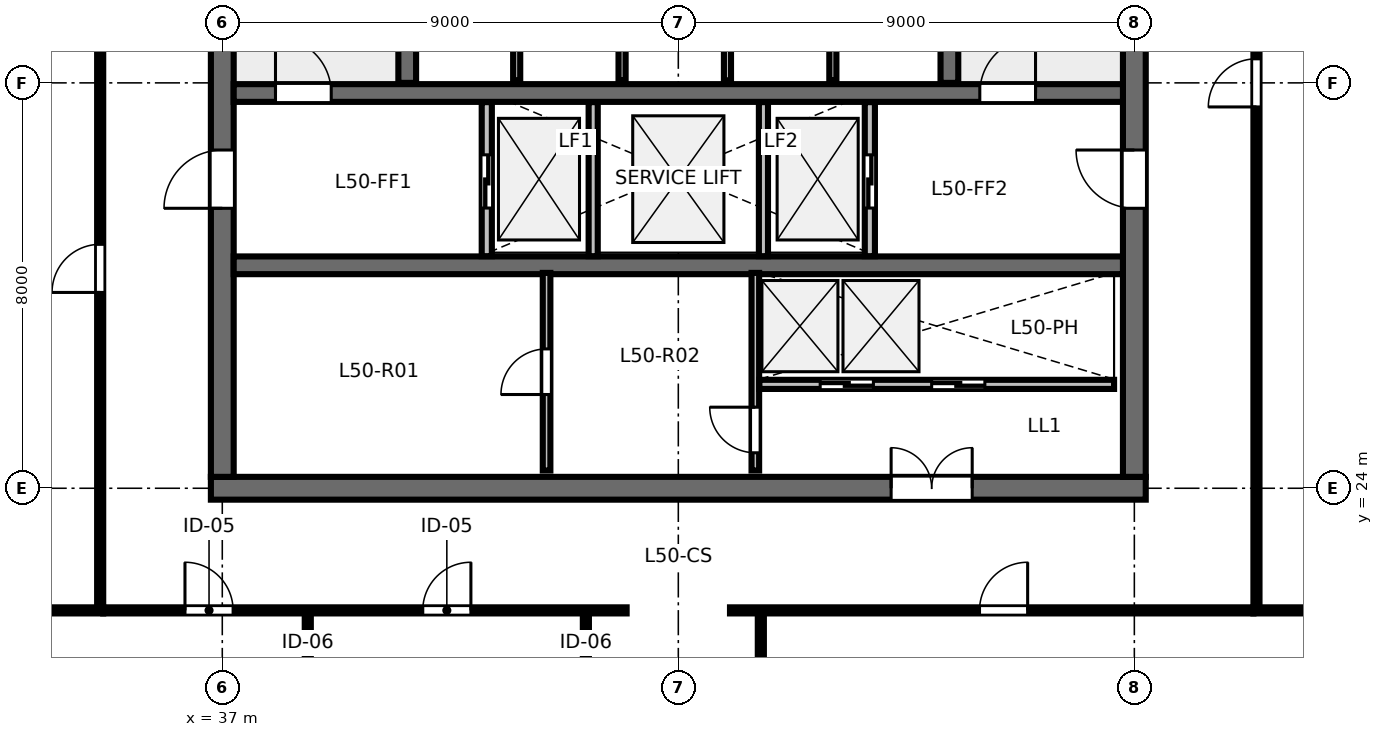
"""IFC4 building model, lengths in metres.
Left out: names, types, materials, properties, quantities, classifications, styles, units other than length and angle.
Written with IfcOpenShell. Run it as: python <this file> out.ifc"""

import sys

from ifc_helpers import new_model, si_unit, direction, frame, frame_2d, origin, place, context, subcontext, project, spatial, rectangle, extrude, element, fill, save


model = new_model("IFC4")
c1 = context("Model", 3, precision=1e-05, world=origin(), true_north=direction((0.0, 1.0)))
c2 = subcontext(c1, "Body", "Model", "MODEL_VIEW")
j1 = project(units=[si_unit("LENGTHUNIT", "METRE"), si_unit("PLANEANGLEUNIT", "RADIAN")], contexts=[c1])
p1 = place(None, origin())
s1 = spatial("IfcSite", under=j1, at=p1, CompositionType="ELEMENT")
p2 = place(p1, origin())
s2 = spatial("IfcBuilding", under=s1, at=p2, CompositionType="ELEMENT")
p3 = place(p2, frame((0.0, 0.0, 191.4)))
s3 = spatial("IfcBuildingStorey", under=s2, at=p3, CompositionType="ELEMENT", Elevation=191.4)
p4 = place(p3, frame((36.775, 24.0, 0.0), z_axis=(0.0, 0.0, 1.0), x_axis=(1.0, 0.0, 0.0)))
e1 = element("IfcWall", 1, at=p4, inside=s3, PredefinedType="SHEAR", context=c2, shape_type="SweptSolid", body=[
    extrude(rectangle(XDim=18.45, YDim=0.45, at=frame_2d((9.225, 0.0))), origin(), (0.0, 0.0, 1.0), 3.36),
])
p5 = place(p4, frame((13.425, 0.0, 0.0)))
e2 = element("IfcOpeningElement", 2, at=p5, cuts=e1, PredefinedType="OPENING", context=c2, shape_type="SweptSolid", body=[
    extrude(rectangle(XDim=1.6, YDim=2.15, at=frame_2d((0.8, 1.075))), frame((0.0, 0.235, 0.0), z_axis=(0.0, -1.0, 0.0), x_axis=(1.0, 0.0, 0.0)), (0.0, 0.0, 1.0), 0.47),
])
p6 = place(p3, frame((37.0, 24.225, 0.0), z_axis=(0.0, 0.0, 1.0), x_axis=(0.0, 1.0, 0.0)))
e3 = element("IfcWall", 3, at=p6, inside=s3, PredefinedType="SHEAR", context=c2, shape_type="SweptSolid", body=[
    extrude(rectangle(XDim=15.55, YDim=0.45, at=frame_2d((7.775, 0.0))), origin(), (0.0, 0.0, 1.0), 3.36),
])
p7 = place(p6, frame((5.3, 0.0, 0.0)))
e4 = element("IfcOpeningElement", 4, at=p7, cuts=e3, PredefinedType="OPENING", context=c2, shape_type="SweptSolid", body=[
    extrude(rectangle(XDim=1.15, YDim=2.15, at=frame_2d((0.575, 1.075))), frame((0.0, 0.235, 0.0), z_axis=(0.0, -1.0, 0.0), x_axis=(1.0, 0.0, 0.0)), (0.0, 0.0, 1.0), 0.47),
])
p8 = place(p3, frame((55.0, 24.225, 0.0), z_axis=(0.0, 0.0, 1.0), x_axis=(0.0, 1.0, 0.0)))
e5 = element("IfcWall", 5, at=p8, inside=s3, PredefinedType="SHEAR", context=c2, shape_type="SweptSolid", body=[
    extrude(rectangle(XDim=15.55, YDim=0.45, at=frame_2d((7.775, 0.0))), origin(), (0.0, 0.0, 1.0), 3.36),
])
p9 = place(p8, frame((5.3, 0.0, 0.0)))
e6 = element("IfcOpeningElement", 6, at=p9, cuts=e5, PredefinedType="OPENING", context=c2, shape_type="SweptSolid", body=[
    extrude(rectangle(XDim=1.15, YDim=2.15, at=frame_2d((0.575, 1.075))), frame((0.0, 0.235, 0.0), z_axis=(0.0, -1.0, 0.0), x_axis=(1.0, 0.0, 0.0)), (0.0, 0.0, 1.0), 0.47),
])
p10 = place(p3, frame((37.225, 31.8, 0.0), z_axis=(0.0, 0.0, 1.0), x_axis=(1.0, 0.0, 0.0)))
e7 = element("IfcWall", 7, at=p10, inside=s3, PredefinedType="SHEAR", context=c2, shape_type="SweptSolid", body=[
    extrude(rectangle(XDim=17.55, YDim=0.35, at=frame_2d((8.775, 0.0))), origin(), (0.0, 0.0, 1.0), 3.36),
])
p11 = place(p10, frame((0.825, 0.0, 0.0)))
e8 = element("IfcOpeningElement", 8, at=p11, cuts=e7, PredefinedType="OPENING", context=c2, shape_type="SweptSolid", body=[
    extrude(rectangle(XDim=1.1, YDim=2.15, at=frame_2d((0.55, 1.075))), frame((0.0, 0.185, 0.0), z_axis=(0.0, -1.0, 0.0), x_axis=(1.0, 0.0, 0.0)), (0.0, 0.0, 1.0), 0.37),
])
p12 = place(p10, frame((14.725, 0.0, 0.0)))
e9 = element("IfcOpeningElement", 9, at=p12, cuts=e7, PredefinedType="OPENING", context=c2, shape_type="SweptSolid", body=[
    extrude(rectangle(XDim=1.1, YDim=2.15, at=frame_2d((0.55, 1.075))), frame((0.0, 0.185, 0.0), z_axis=(0.0, -1.0, 0.0), x_axis=(1.0, 0.0, 0.0)), (0.0, 0.0, 1.0), 0.37),
])
p13 = place(p3, frame((37.225, 28.4, 0.0), z_axis=(0.0, 0.0, 1.0), x_axis=(1.0, 0.0, 0.0)))
e10 = element("IfcWall", 10, at=p13, inside=s3, PredefinedType="SHEAR", context=c2, shape_type="SweptSolid", body=[
    extrude(rectangle(XDim=17.55, YDim=0.35, at=frame_2d((8.775, 0.0))), origin(), (0.0, 0.0, 1.0), 3.36),
])
for number, where, z_axis, x_axis in (
    (11, (40.65, 32.0, 0.0), (0.0, 0.0, 1.0), (0.0, 1.0, 0.0)),
    (12, (51.35, 32.0, 0.0), (0.0, 0.0, 1.0), (0.0, 1.0, 0.0)),
):
    element("IfcWall", number, at=place(p3, frame(where, z_axis=z_axis, x_axis=x_axis)), inside=s3, PredefinedType="SHEAR", context=c2, shape_type="SweptSolid", body=[
        extrude(rectangle(XDim=7.7, YDim=0.35, at=frame_2d((3.85, 0.0))), origin(), (0.0, 0.0, 1.0), 3.6),
    ])
for number, where, z_axis, x_axis in (
    (13, (42.81, 32.05, 0.0), (0.0, 0.0, 1.0), (0.0, 1.0, 0.0)),
    (14, (44.89, 32.05, 0.0), (0.0, 0.0, 1.0), (0.0, 1.0, 0.0)),
    (15, (46.97, 32.05, 0.0), (0.0, 0.0, 1.0), (0.0, 1.0, 0.0)),
    (16, (49.05, 32.05, 0.0), (0.0, 0.0, 1.0), (0.0, 1.0, 0.0)),
):
    element("IfcWall", number, at=place(p3, frame(where, z_axis=z_axis, x_axis=x_axis)), inside=s3, PredefinedType="PARTITIONING", context=c2, shape_type="SweptSolid", body=[
        extrude(rectangle(XDim=5.5, YDim=0.14, at=frame_2d((2.75, 0.0))), origin(), (0.0, 0.0, 1.0), 3.375),
    ])
p14 = place(p3, frame((42.22, 28.58, 0.0), z_axis=(0.0, 0.0, 1.0), x_axis=(0.0, 1.0, 0.0)))
e17 = element("IfcWall", 17, at=p14, inside=s3, PredefinedType="PARTITIONING", context=c2, shape_type="SweptSolid", body=[
    extrude(rectangle(XDim=3.04, YDim=0.2, at=frame_2d((1.52, 0.0))), origin(), (0.0, 0.0, 1.0), 3.375),
])
p15 = place(p14, frame((0.95, 0.0, 0.0)))
e18 = element("IfcOpeningElement", 18, at=p15, cuts=e17, PredefinedType="OPENING", context=c2, shape_type="SweptSolid", body=[
    extrude(rectangle(XDim=1.05, YDim=2.15, at=frame_2d((0.525, 1.075))), frame((0.0, 0.11, 0.0), z_axis=(0.0, -1.0, 0.0), x_axis=(1.0, 0.0, 0.0)), (0.0, 0.0, 1.0), 0.22),
])
p16 = place(p3, frame((49.78, 28.58, 0.0), z_axis=(0.0, 0.0, 1.0), x_axis=(0.0, 1.0, 0.0)))
e19 = element("IfcWall", 19, at=p16, inside=s3, PredefinedType="PARTITIONING", context=c2, shape_type="SweptSolid", body=[
    extrude(rectangle(XDim=3.04, YDim=0.2, at=frame_2d((1.52, 0.0))), origin(), (0.0, 0.0, 1.0), 3.375),
])
p17 = place(p16, frame((0.95, 0.0, 0.0)))
e20 = element("IfcOpeningElement", 20, at=p17, cuts=e19, PredefinedType="OPENING", context=c2, shape_type="SweptSolid", body=[
    extrude(rectangle(XDim=1.05, YDim=2.15, at=frame_2d((0.525, 1.075))), frame((0.0, 0.11, 0.0), z_axis=(0.0, -1.0, 0.0), x_axis=(1.0, 0.0, 0.0)), (0.0, 0.0, 1.0), 0.22),
])
for number, where, z_axis, x_axis in (
    (21, (44.32, 28.58, 0.0), (0.0, 0.0, 1.0), (0.0, 1.0, 0.0)),
    (22, (47.68, 28.58, 0.0), (0.0, 0.0, 1.0), (0.0, 1.0, 0.0)),
):
    element("IfcWall", number, at=place(p3, frame(where, z_axis=z_axis, x_axis=x_axis)), inside=s3, PredefinedType="PARTITIONING", context=c2, shape_type="SweptSolid", body=[
        extrude(rectangle(XDim=3.04, YDim=0.18, at=frame_2d((1.52, 0.0))), origin(), (0.0, 0.0, 1.0), 3.375),
    ])
p18 = place(p3, frame((43.4, 24.35, 0.0), z_axis=(0.0, 0.0, 1.0), x_axis=(0.0, 1.0, 0.0)))
e23 = element("IfcWall", 23, at=p18, inside=s3, PredefinedType="PARTITIONING", context=c2, shape_type="SweptSolid", body=[
    extrude(rectangle(XDim=3.9, YDim=0.15, at=frame_2d((1.95, 0.0))), origin(), (0.0, 0.0, 1.0), 3.375),
])
p19 = place(p18, frame((1.5, 0.0, 0.0)))
e24 = element("IfcOpeningElement", 24, at=p19, cuts=e23, PredefinedType="OPENING", context=c2, shape_type="SweptSolid", body=[
    extrude(rectangle(XDim=0.9, YDim=2.15, at=frame_2d((0.45, 1.075))), frame((0.0, 0.085, 0.0), z_axis=(0.0, -1.0, 0.0), x_axis=(1.0, 0.0, 0.0)), (0.0, 0.0, 1.0), 0.17),
])
p20 = place(p3, frame((47.52, 24.35, 0.0), z_axis=(0.0, 0.0, 1.0), x_axis=(0.0, 1.0, 0.0)))
e25 = element("IfcWall", 25, at=p20, inside=s3, PredefinedType="PARTITIONING", context=c2, shape_type="SweptSolid", body=[
    extrude(rectangle(XDim=3.9, YDim=0.15, at=frame_2d((1.95, 0.0))), origin(), (0.0, 0.0, 1.0), 3.375),
])
p21 = place(p20, frame((0.35, 0.0, 0.0)))
e26 = element("IfcOpeningElement", 26, at=p21, cuts=e25, PredefinedType="OPENING", context=c2, shape_type="SweptSolid", body=[
    extrude(rectangle(XDim=0.9, YDim=2.15, at=frame_2d((0.45, 1.075))), frame((0.0, 0.085, 0.0), z_axis=(0.0, -1.0, 0.0), x_axis=(1.0, 0.0, 0.0)), (0.0, 0.0, 1.0), 0.17),
])
p22 = place(p3, frame((47.6, 26.05, 0.0), z_axis=(0.0, 0.0, 1.0), x_axis=(1.0, 0.0, 0.0)))
e27 = element("IfcWall", 27, at=p22, inside=s3, PredefinedType="PARTITIONING", context=c2, shape_type="SweptSolid", body=[
    extrude(rectangle(XDim=7.0, YDim=0.18, at=frame_2d((3.5, 0.0))), origin(), (0.0, 0.0, 1.0), 3.375),
])
p23 = place(p22, frame((1.2, 0.0, 0.0)))
e28 = element("IfcOpeningElement", 28, at=p23, cuts=e27, PredefinedType="OPENING", context=c2, shape_type="SweptSolid", body=[
    extrude(rectangle(XDim=1.05, YDim=2.15, at=frame_2d((0.525, 1.075))), frame((0.0, 0.1, 0.0), z_axis=(0.0, -1.0, 0.0), x_axis=(1.0, 0.0, 0.0)), (0.0, 0.0, 1.0), 0.2),
])
p24 = place(p22, frame((3.4, 0.0, 0.0)))
e29 = element("IfcOpeningElement", 29, at=p24, cuts=e27, PredefinedType="OPENING", context=c2, shape_type="SweptSolid", body=[
    extrude(rectangle(XDim=1.05, YDim=2.15, at=frame_2d((0.525, 1.075))), frame((0.0, 0.1, 0.0), z_axis=(0.0, -1.0, 0.0), x_axis=(1.0, 0.0, 0.0)), (0.0, 0.0, 1.0), 0.2),
])
p25 = place(p3, frame((38.687, 21.59, 0.0), z_axis=(0.0, 0.0, 1.0), x_axis=(0.0, -1.0, 0.0)))
e30 = element("IfcWall", 30, at=p25, inside=s3, PredefinedType="PARTITIONING", context=c2, shape_type="SweptSolid", body=[
    extrude(rectangle(XDim=8.67, YDim=0.12, at=frame_2d((4.335, 0.0))), origin(), (0.0, 0.0, 1.0), 2.655),
])
p26 = place(p25, frame((1.4, 0.0, 0.0)))
e31 = element("IfcOpeningElement", 31, at=p26, cuts=e30, PredefinedType="OPENING", context=c2, shape_type="SweptSolid", body=[
    extrude(rectangle(XDim=0.9, YDim=2.15, at=frame_2d((0.45, 1.075))), frame((0.0, 0.07, 0.0), z_axis=(0.0, -1.0, 0.0), x_axis=(1.0, 0.0, 0.0)), (0.0, 0.0, 1.0), 0.14),
])
p27 = place(p3, frame((44.176, 21.59, 0.0), z_axis=(0.0, 0.0, 1.0), x_axis=(0.0, -1.0, 0.0)))
e32 = element("IfcWall", 32, at=p27, inside=s3, PredefinedType="PARTITIONING", context=c2, shape_type="SweptSolid", body=[
    extrude(rectangle(XDim=8.67, YDim=0.12, at=frame_2d((4.335, 0.0))), origin(), (0.0, 0.0, 1.0), 2.655),
])
p28 = place(p27, frame((1.4, 0.0, 0.0)))
e33 = element("IfcOpeningElement", 33, at=p28, cuts=e32, PredefinedType="OPENING", context=c2, shape_type="SweptSolid", body=[
    extrude(rectangle(XDim=0.9, YDim=2.15, at=frame_2d((0.45, 1.075))), frame((0.0, 0.07, 0.0), z_axis=(0.0, -1.0, 0.0), x_axis=(1.0, 0.0, 0.0)), (0.0, 0.0, 1.0), 0.14),
])
p29 = place(p3, frame((47.629, 21.59, 0.0), z_axis=(0.0, 0.0, 1.0), x_axis=(0.0, -1.0, 0.0)))
e34 = element("IfcWall", 34, at=p29, inside=s3, PredefinedType="PARTITIONING", context=c2, shape_type="SweptSolid", body=[
    extrude(rectangle(XDim=8.67, YDim=0.12, at=frame_2d((4.335, 0.0))), origin(), (0.0, 0.0, 1.0), 2.655),
])
p30 = place(p29, frame((1.4, 0.0, 0.0)))
e35 = element("IfcOpeningElement", 35, at=p30, cuts=e34, PredefinedType="OPENING", context=c2, shape_type="SweptSolid", body=[
    extrude(rectangle(XDim=0.9, YDim=2.15, at=frame_2d((0.45, 1.075))), frame((0.0, 0.07, 0.0), z_axis=(0.0, -1.0, 0.0), x_axis=(1.0, 0.0, 0.0)), (0.0, 0.0, 1.0), 0.14),
])
p31 = place(p3, frame((34.65, 21.59, 0.0), z_axis=(0.0, 0.0, 1.0), x_axis=(1.0, 0.0, 0.0)))
e36 = element("IfcWall", 36, at=p31, inside=s3, PredefinedType="PARTITIONING", context=c2, shape_type="SweptSolid", body=[
    extrude(rectangle(XDim=10.33, YDim=0.12, at=frame_2d((5.165, 0.0))), origin(), (0.0, 0.0, 1.0), 2.655),
])
p32 = place(p31, frame((1.614, 0.0, 0.0)))
e37 = element("IfcOpeningElement", 37, at=p32, cuts=e36, PredefinedType="OPENING", context=c2, shape_type="SweptSolid", body=[
    extrude(rectangle(XDim=0.95, YDim=2.15, at=frame_2d((0.475, 1.075))), frame((0.0, 0.07, 0.0), z_axis=(0.0, -1.0, 0.0), x_axis=(1.0, 0.0, 0.0)), (0.0, 0.0, 1.0), 0.14),
])
p33 = place(p31, frame((6.306, 0.0, 0.0)))
e38 = element("IfcOpeningElement", 38, at=p33, cuts=e36, PredefinedType="OPENING", context=c2, shape_type="SweptSolid", body=[
    extrude(rectangle(XDim=0.95, YDim=2.15, at=frame_2d((0.475, 1.075))), frame((0.0, 0.07, 0.0), z_axis=(0.0, -1.0, 0.0), x_axis=(1.0, 0.0, 0.0)), (0.0, 0.0, 1.0), 0.14),
])
p34 = place(p3, frame((47.02, 21.59, 0.0), z_axis=(0.0, 0.0, 1.0), x_axis=(1.0, 0.0, 0.0)))
e39 = element("IfcWall", 39, at=p34, inside=s3, PredefinedType="PARTITIONING", context=c2, shape_type="SweptSolid", body=[
    extrude(rectangle(XDim=10.33, YDim=0.12, at=frame_2d((5.165, 0.0))), origin(), (0.0, 0.0, 1.0), 2.655),
])
p35 = place(p34, frame((4.924, 0.0, 0.0)))
e40 = element("IfcOpeningElement", 40, at=p35, cuts=e39, PredefinedType="OPENING", context=c2, shape_type="SweptSolid", body=[
    extrude(rectangle(XDim=0.95, YDim=2.15, at=frame_2d((0.475, 1.075))), frame((0.0, 0.07, 0.0), z_axis=(0.0, -1.0, 0.0), x_axis=(1.0, 0.0, 0.0)), (0.0, 0.0, 1.0), 0.14),
])
p36 = place(p3, frame((34.59, 21.65, 0.0), z_axis=(0.0, 0.0, 1.0), x_axis=(0.0, 1.0, 0.0)))
e41 = element("IfcWall", 41, at=p36, inside=s3, PredefinedType="PARTITIONING", context=c2, shape_type="SweptSolid", body=[
    extrude(rectangle(XDim=20.7, YDim=0.12, at=frame_2d((10.35, 0.0))), origin(), (0.0, 0.0, 1.0), 2.655),
])
p37 = place(p36, frame((6.214, 0.0, 0.0)))
e42 = element("IfcOpeningElement", 42, at=p37, cuts=e41, PredefinedType="OPENING", context=c2, shape_type="SweptSolid", body=[
    extrude(rectangle(XDim=0.95, YDim=2.15, at=frame_2d((0.475, 1.075))), frame((0.0, 0.07, 0.0), z_axis=(0.0, -1.0, 0.0), x_axis=(1.0, 0.0, 0.0)), (0.0, 0.0, 1.0), 0.14),
])
p38 = place(p36, frame((16.365, 0.0, 0.0)))
e43 = element("IfcOpeningElement", 43, at=p38, cuts=e41, PredefinedType="OPENING", context=c2, shape_type="SweptSolid", body=[
    extrude(rectangle(XDim=0.95, YDim=2.15, at=frame_2d((0.475, 1.075))), frame((0.0, 0.07, 0.0), z_axis=(0.0, -1.0, 0.0), x_axis=(1.0, 0.0, 0.0)), (0.0, 0.0, 1.0), 0.14),
])
p39 = place(p3, frame((57.41, 21.65, 0.0), z_axis=(0.0, 0.0, 1.0), x_axis=(0.0, 1.0, 0.0)))
e44 = element("IfcWall", 44, at=p39, inside=s3, PredefinedType="PARTITIONING", context=c2, shape_type="SweptSolid", body=[
    extrude(rectangle(XDim=20.7, YDim=0.12, at=frame_2d((10.35, 0.0))), origin(), (0.0, 0.0, 1.0), 2.655),
])
p40 = place(p39, frame((9.875, 0.0, 0.0)))
e45 = element("IfcOpeningElement", 45, at=p40, cuts=e44, PredefinedType="OPENING", context=c2, shape_type="SweptSolid", body=[
    extrude(rectangle(XDim=0.95, YDim=2.15, at=frame_2d((0.475, 1.075))), frame((0.0, 0.07, 0.0), z_axis=(0.0, -1.0, 0.0), x_axis=(1.0, 0.0, 0.0)), (0.0, 0.0, 1.0), 0.14),
])
for number, where, z_axis, x_axis in (
    (46, (34.65, 21.59, 0.0), (0.0, 0.0, 1.0), (-1.0, 0.0, 0.0)),
    (47, (57.35, 21.59, 0.0), (0.0, 0.0, 1.0), (1.0, 0.0, 0.0)),
):
    element("IfcWall", number, at=place(p3, frame(where, z_axis=z_axis, x_axis=x_axis)), inside=s3, PredefinedType="PARTITIONING", context=c2, shape_type="SweptSolid", body=[
        extrude(rectangle(XDim=10.25, YDim=0.12, at=frame_2d((5.125, 0.0))), origin(), (0.0, 0.0, 1.0), 2.655),
    ])
p41 = place(p11, origin())
e48 = element("IfcDoor", 48, at=p41, inside=s3, OperationType="SINGLE_SWING_LEFT", PredefinedType="DOOR", context=c2, shape_type="SweptSolid", body=[
    extrude(rectangle(XDim=1.1, YDim=2.15, at=frame_2d((0.55, 1.075))), frame((0.0, 0.025, 0.0), z_axis=(0.0, -1.0, 0.0), x_axis=(1.0, 0.0, 0.0)), (0.0, 0.0, 1.0), 0.05),
])
fill(e8, e48)
p42 = place(p12, origin())
e49 = element("IfcDoor", 49, at=p42, inside=s3, OperationType="SINGLE_SWING_RIGHT", PredefinedType="DOOR", context=c2, shape_type="SweptSolid", body=[
    extrude(rectangle(XDim=1.1, YDim=2.15, at=frame_2d((0.55, 1.075))), frame((0.0, 0.025, 0.0), z_axis=(0.0, -1.0, 0.0), x_axis=(1.0, 0.0, 0.0)), (0.0, 0.0, 1.0), 0.05),
])
fill(e9, e49)
p43 = place(p7, origin())
e50 = element("IfcDoor", 50, at=p43, inside=s3, OperationType="SINGLE_SWING_LEFT", PredefinedType="DOOR", context=c2, shape_type="SweptSolid", body=[
    extrude(rectangle(XDim=1.15, YDim=2.15, at=frame_2d((0.575, 1.075))), frame((0.0, 0.025, 0.0), z_axis=(0.0, -1.0, 0.0), x_axis=(1.0, 0.0, 0.0)), (0.0, 0.0, 1.0), 0.05),
])
fill(e4, e50)
p44 = place(p9, origin())
e51 = element("IfcDoor", 51, at=p44, inside=s3, OperationType="SINGLE_SWING_RIGHT", PredefinedType="DOOR", context=c2, shape_type="SweptSolid", body=[
    extrude(rectangle(XDim=1.15, YDim=2.15, at=frame_2d((0.575, 1.075))), frame((0.0, 0.025, 0.0), z_axis=(0.0, -1.0, 0.0), x_axis=(1.0, 0.0, 0.0)), (0.0, 0.0, 1.0), 0.05),
])
fill(e6, e51)
p45 = place(p5, origin())
e52 = element("IfcDoor", 52, at=p45, inside=s3, OperationType="DOUBLE_DOOR_SINGLE_SWING", PredefinedType="DOOR", context=c2, shape_type="SweptSolid", body=[
    extrude(rectangle(XDim=1.6, YDim=2.15, at=frame_2d((0.8, 1.075))), frame((0.0, 0.025, 0.0), z_axis=(0.0, -1.0, 0.0), x_axis=(1.0, 0.0, 0.0)), (0.0, 0.0, 1.0), 0.05),
])
fill(e2, e52)
p46 = place(p15, origin())
e53 = element("IfcDoor", 53, at=p46, inside=s3, OperationType="SLIDING_TO_LEFT", PredefinedType="DOOR", context=c2, shape_type="SweptSolid", body=[
    extrude(rectangle(XDim=1.05, YDim=2.15, at=frame_2d((0.525, 1.075))), frame((0.0, 0.025, 0.0), z_axis=(0.0, -1.0, 0.0), x_axis=(1.0, 0.0, 0.0)), (0.0, 0.0, 1.0), 0.05),
])
fill(e18, e53)
p47 = place(p17, origin())
e54 = element("IfcDoor", 54, at=p47, inside=s3, OperationType="SLIDING_TO_RIGHT", PredefinedType="DOOR", context=c2, shape_type="SweptSolid", body=[
    extrude(rectangle(XDim=1.05, YDim=2.15, at=frame_2d((0.525, 1.075))), frame((0.0, 0.025, 0.0), z_axis=(0.0, -1.0, 0.0), x_axis=(1.0, 0.0, 0.0)), (0.0, 0.0, 1.0), 0.05),
])
fill(e20, e54)
p48 = place(p19, origin())
e55 = element("IfcDoor", 55, at=p48, inside=s3, OperationType="SINGLE_SWING_LEFT", PredefinedType="DOOR", context=c2, shape_type="SweptSolid", body=[
    extrude(rectangle(XDim=0.9, YDim=2.15, at=frame_2d((0.45, 1.075))), frame((0.0, 0.025, 0.0), z_axis=(0.0, -1.0, 0.0), x_axis=(1.0, 0.0, 0.0)), (0.0, 0.0, 1.0), 0.05),
])
fill(e24, e55)
p49 = place(p21, origin())
e56 = element("IfcDoor", 56, at=p49, inside=s3, OperationType="SINGLE_SWING_RIGHT", PredefinedType="DOOR", context=c2, shape_type="SweptSolid", body=[
    extrude(rectangle(XDim=0.9, YDim=2.15, at=frame_2d((0.45, 1.075))), frame((0.0, 0.025, 0.0), z_axis=(0.0, -1.0, 0.0), x_axis=(1.0, 0.0, 0.0)), (0.0, 0.0, 1.0), 0.05),
])
fill(e26, e56)
p50 = place(p23, origin())
e57 = element("IfcDoor", 57, at=p50, inside=s3, OperationType="SLIDING_TO_LEFT", PredefinedType="DOOR", context=c2, shape_type="SweptSolid", body=[
    extrude(rectangle(XDim=1.05, YDim=2.15, at=frame_2d((0.525, 1.075))), frame((0.0, 0.025, 0.0), z_axis=(0.0, -1.0, 0.0), x_axis=(1.0, 0.0, 0.0)), (0.0, 0.0, 1.0), 0.05),
])
fill(e28, e57)
p51 = place(p24, origin())
e58 = element("IfcDoor", 58, at=p51, inside=s3, OperationType="SLIDING_TO_RIGHT", PredefinedType="DOOR", context=c2, shape_type="SweptSolid", body=[
    extrude(rectangle(XDim=1.05, YDim=2.15, at=frame_2d((0.525, 1.075))), frame((0.0, 0.025, 0.0), z_axis=(0.0, -1.0, 0.0), x_axis=(1.0, 0.0, 0.0)), (0.0, 0.0, 1.0), 0.05),
])
fill(e29, e58)
p52 = place(p32, origin())
e59 = element("IfcDoor", 59, at=p52, inside=s3, OperationType="SINGLE_SWING_LEFT", PredefinedType="DOOR", context=c2, shape_type="SweptSolid", body=[
    extrude(rectangle(XDim=0.95, YDim=2.15, at=frame_2d((0.475, 1.075))), frame((0.0, 0.025, 0.0), z_axis=(0.0, -1.0, 0.0), x_axis=(1.0, 0.0, 0.0)), (0.0, 0.0, 1.0), 0.05),
])
fill(e37, e59)
p53 = place(p33, origin())
e60 = element("IfcDoor", 60, at=p53, inside=s3, OperationType="SINGLE_SWING_RIGHT", PredefinedType="DOOR", context=c2, shape_type="SweptSolid", body=[
    extrude(rectangle(XDim=0.95, YDim=2.15, at=frame_2d((0.475, 1.075))), frame((0.0, 0.025, 0.0), z_axis=(0.0, -1.0, 0.0), x_axis=(1.0, 0.0, 0.0)), (0.0, 0.0, 1.0), 0.05),
])
fill(e38, e60)
p54 = place(p35, origin())
e61 = element("IfcDoor", 61, at=p54, inside=s3, OperationType="SINGLE_SWING_RIGHT", PredefinedType="DOOR", context=c2, shape_type="SweptSolid", body=[
    extrude(rectangle(XDim=0.95, YDim=2.15, at=frame_2d((0.475, 1.075))), frame((0.0, 0.025, 0.0), z_axis=(0.0, -1.0, 0.0), x_axis=(1.0, 0.0, 0.0)), (0.0, 0.0, 1.0), 0.05),
])
fill(e40, e61)
p55 = place(p37, origin())
e62 = element("IfcDoor", 62, at=p55, inside=s3, OperationType="SINGLE_SWING_LEFT", PredefinedType="DOOR", context=c2, shape_type="SweptSolid", body=[
    extrude(rectangle(XDim=0.95, YDim=2.15, at=frame_2d((0.475, 1.075))), frame((0.0, 0.025, 0.0), z_axis=(0.0, -1.0, 0.0), x_axis=(1.0, 0.0, 0.0)), (0.0, 0.0, 1.0), 0.05),
])
fill(e42, e62)
p56 = place(p40, origin())
e63 = element("IfcDoor", 63, at=p56, inside=s3, OperationType="SINGLE_SWING_LEFT", PredefinedType="DOOR", context=c2, shape_type="SweptSolid", body=[
    extrude(rectangle(XDim=0.95, YDim=2.15, at=frame_2d((0.475, 1.075))), frame((0.0, 0.025, 0.0), z_axis=(0.0, -1.0, 0.0), x_axis=(1.0, 0.0, 0.0)), (0.0, 0.0, 1.0), 0.05),
])
fill(e45, e63)
save(model, sys.argv[1])
